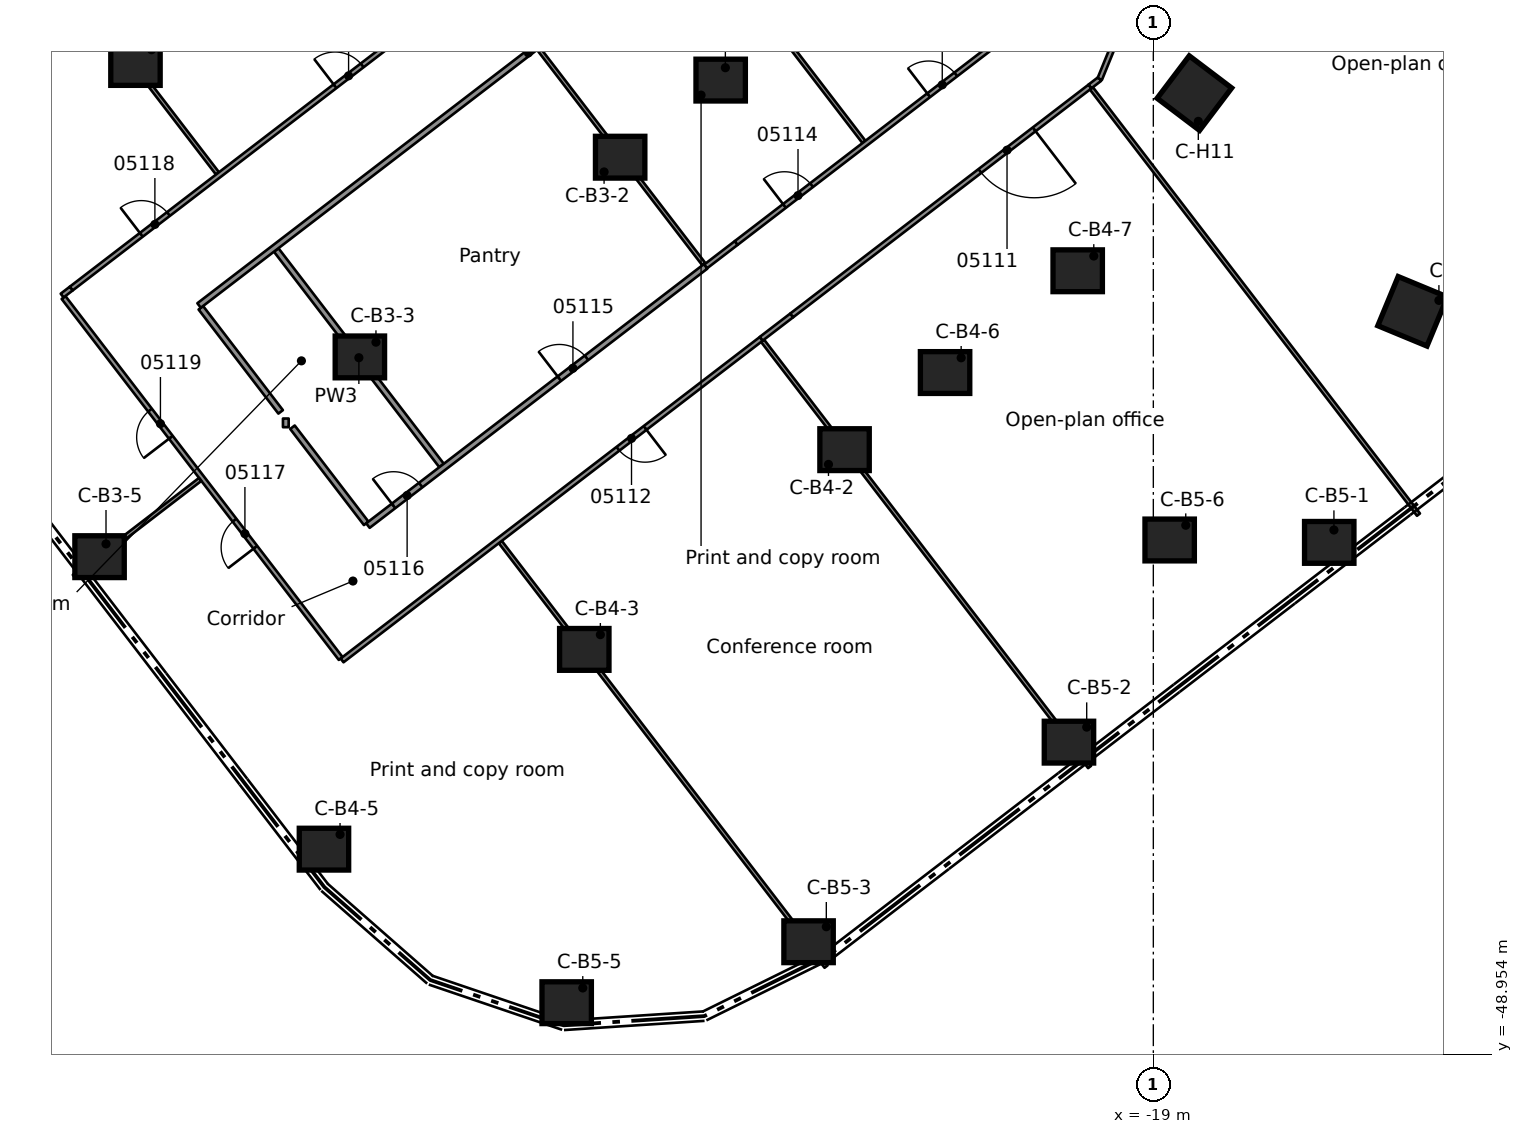
"""IFC4 building model, lengths in metres.
Left out: names, types, materials, properties, quantities, classifications, styles, units other than length and angle.
Written with IfcOpenShell. Run it as: python <this file> out.ifc"""

import sys

from ifc_helpers import new_model, si_unit, direction, frame, frame_2d, origin, origin_2d, place, context, subcontext, project, spatial, rectangle, extrude, element, fill, save


model = new_model("IFC4")
c1 = context("Model", 3, precision=1e-05, world=origin(), true_north=direction((0.0, 1.0)))
c2 = subcontext(c1, "Body", "Model", "MODEL_VIEW")
j1 = project(units=[si_unit("LENGTHUNIT", "METRE"), si_unit("PLANEANGLEUNIT", "RADIAN")], contexts=[c1])
p1 = place(None, origin())
s1 = spatial("IfcSite", under=j1, at=p1, CompositionType="ELEMENT")
p2 = place(p1, origin())
s2 = spatial("IfcBuilding", under=s1, at=p2, CompositionType="ELEMENT")
p3 = place(p2, frame((0.0, 0.0, 25.1)))
s3 = spatial("IfcBuildingStorey", under=s2, at=p3, CompositionType="ELEMENT", Elevation=25.1)
for number, where, z_axis, x_axis in (
    (1, (-45.784, -22.905, 0.0), (0.0, 0.0, 1.0), (1.0, 0.0, 0.0)),
    (2, (-33.03, -25.345, 0.0), (0.0, 0.0, 1.0), (1.0, 0.0, 0.0)),
    (3, (-39.879, -30.6, 0.0), (0.0, 0.0, 1.0), (1.0, 0.0, 0.0)),
    (4, (-46.729, -35.856, 0.0), (0.0, 0.0, 1.0), (1.0, 0.0, 0.0)),
    (5, (-30.385, -23.316, 0.0), (0.0, 0.0, 1.0), (1.0, 0.0, 0.0)),
    (6, (-27.125, -33.04, 0.0), (0.0, 0.0, 1.0), (1.0, 0.0, 0.0)),
    (7, (-33.974, -38.296, 0.0), (0.0, 0.0, 1.0), (1.0, 0.0, 0.0)),
    (8, (-40.824, -43.552, 0.0), (0.0, 0.0, 1.0), (1.0, 0.0, 0.0)),
    (9, (-24.48, -31.011, 0.0), (0.0, 0.0, 1.0), (1.0, 0.0, 0.0)),
    (10, (-20.99, -28.333, 0.0), (0.0, 0.0, 1.0), (1.0, 0.0, 0.0)),
    (11, (-14.371, -35.48, 0.0), (0.0, 0.0, 1.0), (1.0, 0.0, 0.0)),
    (12, (-21.22, -40.736, 0.0), (0.0, 0.0, 1.0), (1.0, 0.0, 0.0)),
    (13, (-28.072, -45.988, 0.0), (0.0, 0.0, 1.0), (1.0, 0.0, 0.0)),
    (14, (-34.437, -47.592, 0.0), (0.0, 0.0, 1.0), (1.0, 0.0, 0.0)),
    (15, (-18.57, -35.417, 0.0), (0.0, 0.0, 1.0), (1.0, 0.0, 0.0)),
):
    element("IfcColumn", number, at=place(p3, frame(where, z_axis=z_axis, x_axis=x_axis)), inside=s3, PredefinedType="COLUMN", context=c2, shape_type="SweptSolid", body=[
        extrude(rectangle(XDim=1.3, YDim=1.1, at=origin_2d()), origin(), (0.0, 0.0, 1.0), 4.1),
    ])
for number, where, z_axis, x_axis in (
    (16, (-12.178, -29.4, 0.0), (0.0, 0.0, 1.0), (-0.383, -0.924, 0.0)),
    (17, (-17.919, -23.659, 0.0), (0.0, 0.0, 1.0), (-0.604, -0.797, 0.0)),
):
    element("IfcColumn", number, at=place(p3, frame(where, z_axis=z_axis, x_axis=x_axis)), inside=s3, PredefinedType="COLUMN", context=c2, shape_type="SweptSolid", body=[
        extrude(rectangle(XDim=1.4, YDim=1.4, at=origin_2d()), origin(), (0.0, 0.0, 1.0), 4.1),
    ])
p4 = place(p3, frame((-40.384, -38.535, 0.0), z_axis=(0.0, 0.0, 1.0), x_axis=(-0.609026744184, 0.793149686294, 0.0)))
e18 = element("IfcWall", 18, at=p4, inside=s3, PredefinedType="PARTITIONING", context=c2, shape_type="SweptSolid", body=[
    extrude(rectangle(XDim=11.975, YDim=0.125, at=frame_2d((5.987, 0.0))), origin(), (0.0, 0.0, 1.0), 3.68),
])
p5 = place(p4, frame((3.688, 0.0, 0.0)))
e19 = element("IfcOpeningElement", 19, at=p5, cuts=e18, PredefinedType="OPENING", context=c2, shape_type="SweptSolid", body=[
    extrude(rectangle(XDim=0.9, YDim=2.1, at=frame_2d((0.45, 1.05))), frame((0.0, 0.073, 0.0), z_axis=(0.0, -1.0, 0.0), x_axis=(1.0, 0.0, 0.0)), (0.0, 0.0, 1.0), 0.145),
])
p6 = place(p4, frame((7.338, 0.0, 0.0)))
e20 = element("IfcOpeningElement", 20, at=p6, cuts=e18, PredefinedType="OPENING", context=c2, shape_type="SweptSolid", body=[
    extrude(rectangle(XDim=0.9, YDim=2.1, at=frame_2d((0.45, 1.05))), frame((0.0, 0.073, 0.0), z_axis=(0.0, -1.0, 0.0), x_axis=(1.0, 0.0, 0.0)), (0.0, 0.0, 1.0), 0.145),
])
p7 = place(p3, frame((-44.064, -29.307, 0.0), z_axis=(0.0, 0.0, 1.0), x_axis=(0.608421148176, -0.793614331053, 0.0)))
e21 = element("IfcWall", 21, at=p7, inside=s3, PredefinedType="PARTITIONING", context=c2, shape_type="SweptSolid", body=[
    extrude(rectangle(XDim=3.451, YDim=0.15, at=frame_2d((1.726, 0.0))), origin(), (0.0, 0.0, 1.0), 3.68),
])
p8 = place(p3, frame((-41.653, -32.45, 0.0), z_axis=(0.0, 0.0, 1.0), x_axis=(0.60867753108, -0.793417710389, 0.0)))
e22 = element("IfcWall", 22, at=p8, inside=s3, PredefinedType="PARTITIONING", context=c2, shape_type="SweptSolid", body=[
    extrude(rectangle(XDim=3.188, YDim=0.15, at=frame_2d((1.594, 0.0))), origin(), (0.0, 0.0, 1.0), 3.68),
])
p9 = place(p3, frame((-52.2, -14.599, 0.0), z_axis=(0.0, 0.0, 1.0), x_axis=(0.608818023879, -0.793309910312, 0.0)))
e23 = element("IfcWall", 23, at=p9, inside=s3, PredefinedType="PARTITIONING", context=c2, shape_type="SweptSolid", body=[
    extrude(rectangle(XDim=14.081, YDim=0.1, at=frame_2d((7.041, 0.0))), origin(), (0.0, 0.0, 1.0), 3.68),
])
p10 = place(p3, frame((-42.081, -27.786, 0.0), z_axis=(0.0, 0.0, 1.0), x_axis=(0.608779288924, -0.793339635577, 0.0)))
e24 = element("IfcWall", 24, at=p10, inside=s3, PredefinedType="PARTITIONING", context=c2, shape_type="SweptSolid", body=[
    extrude(rectangle(XDim=7.147, YDim=0.15, at=frame_2d((3.574, 0.0))), origin(), (0.0, 0.0, 1.0), 3.68),
])
p11 = place(p3, frame((-36.184, -35.471, 0.0), z_axis=(0.0, 0.0, 1.0), x_axis=(0.608732507749, -0.793375531517, 0.0)))
e25 = element("IfcWall", 25, at=p11, inside=s3, PredefinedType="PARTITIONING", context=c2, shape_type="SweptSolid", body=[
    extrude(rectangle(XDim=14.082, YDim=0.1, at=frame_2d((7.041, 0.0))), origin(), (0.0, 0.0, 1.0), 3.68),
])
p12 = place(p3, frame((-35.179, -22.489, 0.0), z_axis=(0.0, 0.0, 1.0), x_axis=(0.608729798771, -0.793377610024, 0.0)))
e26 = element("IfcWall", 26, at=p12, inside=s3, PredefinedType="PARTITIONING", context=c2, shape_type="SweptSolid", body=[
    extrude(rectangle(XDim=7.148, YDim=0.1, at=frame_2d((3.574, 0.0))), origin(), (0.0, 0.0, 1.0), 3.68),
])
p13 = place(p3, frame((-29.282, -30.176, 0.0), z_axis=(0.0, 0.0, 1.0), x_axis=(0.608773787241, -0.793343857333, 0.0)))
e27 = element("IfcWall", 27, at=p13, inside=s3, PredefinedType="PARTITIONING", context=c2, shape_type="SweptSolid", body=[
    extrude(rectangle(XDim=14.135, YDim=0.1, at=frame_2d((7.067, 0.0))), origin(), (0.0, 0.0, 1.0), 3.68),
])
p14 = place(p3, frame((-30.975, -19.261, 0.0), z_axis=(0.0, 0.0, 1.0), x_axis=(0.60876639971, -0.793349526113, 0.0)))
e28 = element("IfcWall", 28, at=p14, inside=s3, PredefinedType="PARTITIONING", context=c2, shape_type="SweptSolid", body=[
    extrude(rectangle(XDim=7.162, YDim=0.1, at=frame_2d((3.581, 0.0))), origin(), (0.0, 0.0, 1.0), 3.68),
])
p15 = place(p3, frame((-20.629, -23.535, 0.0), z_axis=(0.0, 0.0, 1.0), x_axis=(0.608775561638, -0.793342495743, 0.0)))
e29 = element("IfcWall", 29, at=p15, inside=s3, PredefinedType="PARTITIONING", context=c2, shape_type="SweptSolid", body=[
    extrude(rectangle(XDim=14.136, YDim=0.1, at=frame_2d((7.068, 0.0))), origin(), (0.0, 0.0, 1.0), 3.68),
])
p16 = place(p3, frame((-29.32, -30.124, 0.0), z_axis=(0.0, 0.0, 1.0), x_axis=(0.793776779764, 0.608209194198, 0.0)))
e30 = element("IfcWall", 30, at=p16, inside=s3, PredefinedType="PARTITIONING", context=c2, shape_type="SweptSolid", body=[
    extrude(rectangle(XDim=1.014, YDim=0.125, at=frame_2d((0.507, 0.0))), origin(), (0.0, 0.0, 1.0), 3.68),
])
p17 = place(p3, frame((-20.668, -23.484, 0.0), z_axis=(0.0, 0.0, 1.0), x_axis=(0.794079485755, 0.607813927368, 0.0)))
e31 = element("IfcWall", 31, at=p17, inside=s3, PredefinedType="PARTITIONING", context=c2, shape_type="SweptSolid", body=[
    extrude(rectangle(XDim=0.324, YDim=0.125, at=frame_2d((0.162, 0.0))), origin(), (0.0, 0.0, 1.0), 3.68),
])
p18 = place(p3, frame((-29.32, -30.127, 0.0), z_axis=(0.0, 0.0, 1.0), x_axis=(-0.793456491448, -0.608626976217, 0.0)))
e32 = element("IfcWall", 32, at=p18, inside=s3, PredefinedType="PARTITIONING", context=c2, shape_type="SweptSolid", body=[
    extrude(rectangle(XDim=13.898, YDim=0.125, at=frame_2d((6.949, 0.0))), origin(), (0.0, 0.0, 1.0), 3.68),
])
p19 = place(p18, frame((3.849, 0.0, 0.0)))
e33 = element("IfcOpeningElement", 33, at=p19, cuts=e32, PredefinedType="OPENING", context=c2, shape_type="SweptSolid", body=[
    extrude(rectangle(XDim=0.9, YDim=2.1, at=frame_2d((0.45, 1.05))), frame((0.0, 0.073, 0.0), z_axis=(0.0, -1.0, 0.0), x_axis=(1.0, 0.0, 0.0)), (0.0, 0.0, 1.0), 0.145),
])
p20 = place(p3, frame((-20.669, -23.487, 0.0), z_axis=(0.0, 0.0, 1.0), x_axis=(-0.793372266626, -0.608736762935, 0.0)))
e34 = element("IfcWall", 34, at=p20, inside=s3, PredefinedType="PARTITIONING", context=c2, shape_type="SweptSolid", body=[
    extrude(rectangle(XDim=9.889, YDim=0.125, at=frame_2d((4.945, 0.0))), origin(), (0.0, 0.0, 1.0), 3.68),
])
p21 = place(p20, frame((1.849, 0.0, 0.0)))
e35 = element("IfcOpeningElement", 35, at=p21, cuts=e34, PredefinedType="OPENING", context=c2, shape_type="SweptSolid", body=[
    extrude(rectangle(XDim=1.8, YDim=2.1, at=frame_2d((0.9, 1.05))), frame((0.0, 0.073, 0.0), z_axis=(0.0, -1.0, 0.0), x_axis=(1.0, 0.0, 0.0)), (0.0, 0.0, 1.0), 0.145),
])
p22 = place(p3, frame((-30.782, -28.22, 0.0), z_axis=(0.0, 0.0, 1.0), x_axis=(0.793579274907, 0.608466872096, 0.0)))
e36 = element("IfcWall", 36, at=p22, inside=s3, PredefinedType="PARTITIONING", context=c2, shape_type="SweptSolid", body=[
    extrude(rectangle(XDim=1.016, YDim=0.125, at=frame_2d((0.508, 0.0))), origin(), (0.0, 0.0, 1.0), 3.68),
])
p23 = place(p3, frame((-39.667, -35.038, 0.0), z_axis=(0.0, 0.0, 1.0), x_axis=(0.793293656215, 0.608839202917, 0.0)))
e37 = element("IfcWall", 37, at=p23, inside=s3, PredefinedType="PARTITIONING", context=c2, shape_type="SweptSolid", body=[
    extrude(rectangle(XDim=11.2, YDim=0.15, at=frame_2d((5.6, 0.0))), origin(), (0.0, 0.0, 1.0), 3.68),
])
p24 = place(p23, frame((6.35, 0.0, 0.0)))
e38 = element("IfcOpeningElement", 38, at=p24, cuts=e37, PredefinedType="OPENING", context=c2, shape_type="SweptSolid", body=[
    extrude(rectangle(XDim=0.9, YDim=2.1, at=frame_2d((0.45, 1.05))), frame((0.0, 0.085, 0.0), z_axis=(0.0, -1.0, 0.0), x_axis=(1.0, 0.0, 0.0)), (0.0, 0.0, 1.0), 0.17),
])
p25 = place(p23, frame((0.85, 0.0, 0.0)))
e39 = element("IfcOpeningElement", 39, at=p25, cuts=e37, PredefinedType="OPENING", context=c2, shape_type="SweptSolid", body=[
    extrude(rectangle(XDim=0.9, YDim=2.1, at=frame_2d((0.45, 1.05))), frame((0.0, 0.085, 0.0), z_axis=(0.0, -1.0, 0.0), x_axis=(1.0, 0.0, 0.0)), (0.0, 0.0, 1.0), 0.17),
])
p26 = place(p3, frame((-29.976, -27.602, 0.0), z_axis=(0.0, 0.0, 1.0), x_axis=(0.793237948633, 0.608911780843, 0.0)))
e40 = element("IfcWall", 40, at=p26, inside=s3, PredefinedType="PARTITIONING", context=c2, shape_type="SweptSolid", body=[
    extrude(rectangle(XDim=9.336, YDim=0.125, at=frame_2d((4.668, 0.0))), origin(), (0.0, 0.0, 1.0), 3.68),
])
p27 = place(p26, frame((6.385, 0.0, 0.0)))
e41 = element("IfcOpeningElement", 41, at=p27, cuts=e40, PredefinedType="OPENING", context=c2, shape_type="SweptSolid", body=[
    extrude(rectangle(XDim=0.9, YDim=2.1, at=frame_2d((0.45, 1.05))), frame((0.0, 0.073, 0.0), z_axis=(0.0, -1.0, 0.0), x_axis=(1.0, 0.0, 0.0)), (0.0, 0.0, 1.0), 0.145),
])
p28 = place(p26, frame((1.6, 0.0, 0.0)))
e42 = element("IfcOpeningElement", 42, at=p28, cuts=e40, PredefinedType="OPENING", context=c2, shape_type="SweptSolid", body=[
    extrude(rectangle(XDim=0.9, YDim=2.1, at=frame_2d((0.45, 1.05))), frame((0.0, 0.073, 0.0), z_axis=(0.0, -1.0, 0.0), x_axis=(1.0, 0.0, 0.0)), (0.0, 0.0, 1.0), 0.145),
])
p29 = place(p3, frame((-47.403, -36.374, 0.0), z_axis=(0.0, 0.0, 1.0), x_axis=(0.793154740431, 0.609020162008, 0.0)))
e43 = element("IfcWall", 43, at=p29, inside=s3, PredefinedType="PARTITIONING", context=c2, shape_type="SweptSolid", body=[
    extrude(rectangle(XDim=4.187, YDim=0.1, at=frame_2d((2.094, 0.0))), origin(), (0.0, 0.0, 1.0), 3.68),
])
p30 = place(p3, frame((-44.11, -29.247, 0.0), z_axis=(0.0, 0.0, 1.0), x_axis=(0.793471030698, 0.608608021179, 0.0)))
e44 = element("IfcWall", 44, at=p30, inside=s3, PredefinedType="PARTITIONING", context=c2, shape_type="SweptSolid", body=[
    extrude(rectangle(XDim=21.838, YDim=0.15, at=frame_2d((10.919, 0.0))), origin(), (0.0, 0.0, 1.0), 3.68),
])
p31 = place(p3, frame((-47.476, -28.803, 0.0), z_axis=(0.0, 0.0, 1.0), x_axis=(0.793430085013, 0.608661400284, 0.0)))
e45 = element("IfcWall", 45, at=p31, inside=s3, PredefinedType="PARTITIONING", context=c2, shape_type="SweptSolid", body=[
    extrude(rectangle(XDim=13.6, YDim=0.125, at=frame_2d((6.8, 0.0))), origin(), (0.0, 0.0, 1.0), 3.68),
])
p32 = place(p31, frame((2.326, 0.0, 0.0)))
e46 = element("IfcOpeningElement", 46, at=p32, cuts=e45, PredefinedType="OPENING", context=c2, shape_type="SweptSolid", body=[
    extrude(rectangle(XDim=0.9, YDim=2.1, at=frame_2d((0.45, 1.05))), frame((0.0, 0.073, 0.0), z_axis=(0.0, -1.0, 0.0), x_axis=(1.0, 0.0, 0.0)), (0.0, 0.0, 1.0), 0.145),
])
p33 = place(p31, frame((8.75, 0.0, 0.0)))
e47 = element("IfcOpeningElement", 47, at=p33, cuts=e45, PredefinedType="OPENING", context=c2, shape_type="SweptSolid", body=[
    extrude(rectangle(XDim=0.9, YDim=2.1, at=frame_2d((0.45, 1.05))), frame((0.0, 0.073, 0.0), z_axis=(0.0, -1.0, 0.0), x_axis=(1.0, 0.0, 0.0)), (0.0, 0.0, 1.0), 0.145),
])
p34 = place(p3, frame((-47.714, -28.986, 0.0), z_axis=(0.0, 0.0, 1.0), x_axis=(0.792623989105, 0.60971076085, 0.0)))
e48 = element("IfcWall", 48, at=p34, inside=s3, PredefinedType="PARTITIONING", context=c2, shape_type="SweptSolid", body=[
    extrude(rectangle(XDim=0.3, YDim=0.125, at=frame_2d((0.15, 0.0))), origin(), (0.0, 0.0, 1.0), 3.68),
])
p35 = place(p3, frame((-18.51, -18.634, 0.0), z_axis=(0.0, 0.0, 1.0), x_axis=(-0.377932698015, -0.925833071224, 0.0)))
e49 = element("IfcWall", 49, at=p35, inside=s3, PredefinedType="PARTITIONING", context=c2, shape_type="SweptSolid", body=[
    extrude(rectangle(XDim=5.024, YDim=0.125, at=frame_2d((2.512, 0.0))), origin(), (0.0, 0.0, 1.0), 3.68),
])
p36 = place(p35, frame((1.6, 0.0, 0.0)))
e50 = element("IfcOpeningElement", 50, at=p36, cuts=e49, PredefinedType="OPENING", context=c2, shape_type="SweptSolid", body=[
    extrude(rectangle(XDim=1.8, YDim=2.1, at=frame_2d((0.9, 1.05))), frame((0.0, 0.073, 0.0), z_axis=(0.0, -1.0, 0.0), x_axis=(1.0, 0.0, 0.0)), (0.0, 0.0, 1.0), 0.145),
])
p37 = place(p3, frame((-41.828, -32.449, 0.0), z_axis=(0.0, 0.0, 1.0), x_axis=(0.0, 1.0, 0.0)))
e51 = element("IfcWall", 51, at=p37, inside=s3, PredefinedType="PARTITIONING", context=c2, shape_type="SweptSolid", body=[
    extrude(rectangle(XDim=0.228, YDim=0.15, at=frame_2d((0.114, 0.0))), origin(), (0.0, 0.0, 1.0), 3.68),
])
p38 = place(p21, origin())
e52 = element("IfcDoor", 52, at=p38, inside=s3, OperationType="DOUBLE_DOOR_SINGLE_SWING", PredefinedType="DOOR", context=c2, shape_type="SweptSolid", body=[
    extrude(rectangle(XDim=1.8, YDim=2.1, at=frame_2d((0.9, 1.05))), frame((0.0, 0.025, 0.0), z_axis=(0.0, -1.0, 0.0), x_axis=(1.0, 0.0, 0.0)), (0.0, 0.0, 1.0), 0.05),
])
fill(e35, e52)
p39 = place(p19, origin())
e53 = element("IfcDoor", 53, at=p39, inside=s3, OperationType="SINGLE_SWING_LEFT", PredefinedType="DOOR", context=c2, shape_type="SweptSolid", body=[
    extrude(rectangle(XDim=0.9, YDim=2.1, at=frame_2d((0.45, 1.05))), frame((0.0, 0.025, 0.0), z_axis=(0.0, -1.0, 0.0), x_axis=(1.0, 0.0, 0.0)), (0.0, 0.0, 1.0), 0.05),
])
fill(e33, e53)
p40 = place(p27, origin())
e54 = element("IfcDoor", 54, at=p40, inside=s3, OperationType="SINGLE_SWING_RIGHT", PredefinedType="DOOR", context=c2, shape_type="SweptSolid", body=[
    extrude(rectangle(XDim=0.9, YDim=2.1, at=frame_2d((0.45, 1.05))), frame((0.0, 0.025, 0.0), z_axis=(0.0, -1.0, 0.0), x_axis=(1.0, 0.0, 0.0)), (0.0, 0.0, 1.0), 0.05),
])
fill(e41, e54)
p41 = place(p28, origin())
e55 = element("IfcDoor", 55, at=p41, inside=s3, OperationType="SINGLE_SWING_LEFT", PredefinedType="DOOR", context=c2, shape_type="SweptSolid", body=[
    extrude(rectangle(XDim=0.9, YDim=2.1, at=frame_2d((0.45, 1.05))), frame((0.0, 0.025, 0.0), z_axis=(0.0, -1.0, 0.0), x_axis=(1.0, 0.0, 0.0)), (0.0, 0.0, 1.0), 0.05),
])
fill(e42, e55)
p42 = place(p24, origin())
e56 = element("IfcDoor", 56, at=p42, inside=s3, OperationType="SINGLE_SWING_RIGHT", PredefinedType="DOOR", context=c2, shape_type="SweptSolid", body=[
    extrude(rectangle(XDim=0.9, YDim=2.1, at=frame_2d((0.45, 1.05))), frame((0.0, 0.025, 0.0), z_axis=(0.0, -1.0, 0.0), x_axis=(1.0, 0.0, 0.0)), (0.0, 0.0, 1.0), 0.05),
])
fill(e38, e56)
p43 = place(p25, origin())
e57 = element("IfcDoor", 57, at=p43, inside=s3, OperationType="SINGLE_SWING_LEFT", PredefinedType="DOOR", context=c2, shape_type="SweptSolid", body=[
    extrude(rectangle(XDim=0.9, YDim=2.1, at=frame_2d((0.45, 1.05))), frame((0.0, 0.025, 0.0), z_axis=(0.0, -1.0, 0.0), x_axis=(1.0, 0.0, 0.0)), (0.0, 0.0, 1.0), 0.05),
])
fill(e39, e57)
p44 = place(p5, origin())
e58 = element("IfcDoor", 58, at=p44, inside=s3, OperationType="SINGLE_SWING_LEFT", PredefinedType="DOOR", context=c2, shape_type="SweptSolid", body=[
    extrude(rectangle(XDim=0.9, YDim=2.1, at=frame_2d((0.45, 1.05))), frame((0.0, 0.025, 0.0), z_axis=(0.0, -1.0, 0.0), x_axis=(1.0, 0.0, 0.0)), (0.0, 0.0, 1.0), 0.05),
])
fill(e19, e58)
p45 = place(p32, origin())
e59 = element("IfcDoor", 59, at=p45, inside=s3, OperationType="SINGLE_SWING_LEFT", PredefinedType="DOOR", context=c2, shape_type="SweptSolid", body=[
    extrude(rectangle(XDim=0.9, YDim=2.1, at=frame_2d((0.45, 1.05))), frame((0.0, 0.025, 0.0), z_axis=(0.0, -1.0, 0.0), x_axis=(1.0, 0.0, 0.0)), (0.0, 0.0, 1.0), 0.05),
])
fill(e46, e59)
p46 = place(p6, origin())
e60 = element("IfcDoor", 60, at=p46, inside=s3, OperationType="SINGLE_SWING_RIGHT", PredefinedType="DOOR", context=c2, shape_type="SweptSolid", body=[
    extrude(rectangle(XDim=0.9, YDim=2.1, at=frame_2d((0.45, 1.05))), frame((0.0, 0.025, 0.0), z_axis=(0.0, -1.0, 0.0), x_axis=(1.0, 0.0, 0.0)), (0.0, 0.0, 1.0), 0.05),
])
fill(e20, e60)
p47 = place(p33, origin())
e61 = element("IfcDoor", 61, at=p47, inside=s3, OperationType="SINGLE_SWING_RIGHT", PredefinedType="DOOR", context=c2, shape_type="SweptSolid", body=[
    extrude(rectangle(XDim=0.9, YDim=2.1, at=frame_2d((0.45, 1.05))), frame((0.0, 0.025, 0.0), z_axis=(0.0, -1.0, 0.0), x_axis=(1.0, 0.0, 0.0)), (0.0, 0.0, 1.0), 0.05),
])
fill(e47, e61)
save(model, sys.argv[1])
